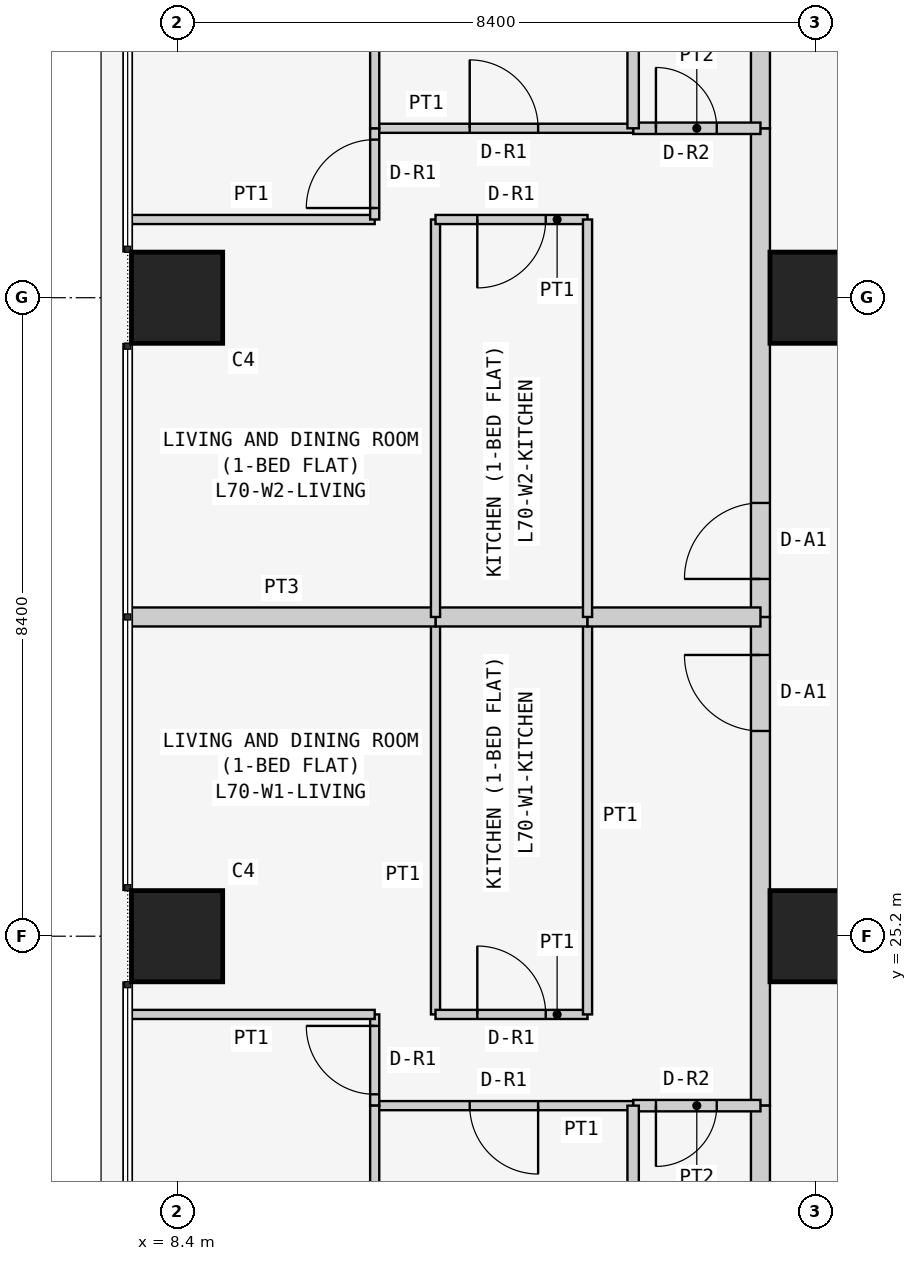
"""IFC4 building model, lengths in metres.
Left out: names, types, materials, properties, quantities, classifications, styles, units other than length and angle.
Written with IfcOpenShell. Run it as: python <this file> out.ifc"""

import sys

from ifc_helpers import new_model, si_unit, direction, frame, frame_2d, origin, origin_2d, place, context, subcontext, project, spatial, rectangle, extrude, element, fill, save


model = new_model("IFC4")
c1 = context("Model", 3, precision=1e-05, world=origin(), true_north=direction((0.0, 1.0)))
c2 = subcontext(c1, "Body", "Model", "MODEL_VIEW")
j1 = project(units=[si_unit("LENGTHUNIT", "METRE"), si_unit("PLANEANGLEUNIT", "RADIAN")], contexts=[c1])
p1 = place(None, origin())
s1 = spatial("IfcSite", under=j1, at=p1, CompositionType="ELEMENT")
p2 = place(p1, origin())
s2 = spatial("IfcBuilding", under=s1, at=p2, CompositionType="ELEMENT")
p3 = place(p2, frame((0.0, 0.0, 268.5)))
s3 = spatial("IfcBuildingStorey", under=s2, at=p3, CompositionType="ELEMENT", Elevation=268.5)
for number, where, z_axis, x_axis in (
    (1, (8.4, 25.2, 0.0), (0.0, 0.0, 1.0), (1.0, 0.0, 0.0)),
    (2, (8.4, 33.6, 0.0), (0.0, 0.0, 1.0), (1.0, 0.0, 0.0)),
    (3, (16.8, 25.2, 0.0), (0.0, 0.0, 1.0), (1.0, 0.0, 0.0)),
    (4, (16.8, 33.6, 0.0), (0.0, 0.0, 1.0), (1.0, 0.0, 0.0)),
):
    element("IfcColumn", number, at=place(p3, frame(where, z_axis=z_axis, x_axis=x_axis)), inside=s3, PredefinedType="COLUMN", context=c2, shape_type="SweptSolid", body=[
        extrude(rectangle(XDim=1.2, YDim=1.2, at=origin_2d()), origin(), (0.0, 0.0, 1.0), 3.6),
    ])
p4 = place(p3, frame((16.075, 22.971, 0.0), z_axis=(0.0, 0.0, 1.0), x_axis=(0.0, 1.0, 0.0)))
e5 = element("IfcWall", 5, at=p4, inside=s3, PredefinedType="PARTITIONING", context=c2, shape_type="SweptSolid", body=[
    extrude(rectangle(XDim=6.429, YDim=0.25, at=frame_2d((3.214, 0.0))), origin(), (0.0, 0.0, 1.0), 3.45),
])
p5 = place(p4, frame((4.929, 0.0, 0.0)))
e6 = element("IfcOpeningElement", 6, at=p5, cuts=e5, PredefinedType="OPENING", context=c2, shape_type="SweptSolid", body=[
    extrude(rectangle(XDim=1.0, YDim=2.1, at=frame_2d((0.5, 1.05))), frame((0.0, 0.135, 0.0), z_axis=(0.0, -1.0, 0.0), x_axis=(1.0, 0.0, 0.0)), (0.0, 0.0, 1.0), 0.27),
])
p6 = place(p3, frame((16.075, 16.1, 0.0), z_axis=(0.0, 0.0, 1.0), x_axis=(0.0, 1.0, 0.0)))
e7 = element("IfcWall", 7, at=p6, inside=s3, PredefinedType="PARTITIONING", context=c2, shape_type="SweptSolid", body=[
    extrude(rectangle(XDim=6.871, YDim=0.25, at=frame_2d((3.436, 0.0))), origin(), (0.0, 0.0, 1.0), 3.45),
])
p7 = place(p3, frame((16.075, 29.4, 0.0), z_axis=(0.0, 0.0, 1.0), x_axis=(0.0, 1.0, 0.0)))
e8 = element("IfcWall", 8, at=p7, inside=s3, PredefinedType="PARTITIONING", context=c2, shape_type="SweptSolid", body=[
    extrude(rectangle(XDim=6.429, YDim=0.25, at=frame_2d((3.215, 0.0))), origin(), (0.0, 0.0, 1.0), 3.45),
])
p8 = place(p7, frame((0.5, 0.0, 0.0)))
e9 = element("IfcOpeningElement", 9, at=p8, cuts=e8, PredefinedType="OPENING", context=c2, shape_type="SweptSolid", body=[
    extrude(rectangle(XDim=1.0, YDim=2.1, at=frame_2d((0.5, 1.05))), frame((0.0, 0.135, 0.0), z_axis=(0.0, -1.0, 0.0), x_axis=(1.0, 0.0, 0.0)), (0.0, 0.0, 1.0), 0.27),
])
p9 = place(p3, frame((16.075, 35.829, 0.0), z_axis=(0.0, 0.0, 1.0), x_axis=(0.0, 1.0, 0.0)))
e10 = element("IfcWall", 10, at=p9, inside=s3, PredefinedType="PARTITIONING", context=c2, shape_type="SweptSolid", body=[
    extrude(rectangle(XDim=6.871, YDim=0.25, at=frame_2d((3.436, 0.0))), origin(), (0.0, 0.0, 1.0), 3.45),
])
p10 = place(p3, frame((11.8, 29.4, 0.0), z_axis=(0.0, 0.0, 1.0), x_axis=(0.0, -1.0, 0.0)))
e11 = element("IfcWall", 11, at=p10, inside=s3, PredefinedType="PARTITIONING", context=c2, shape_type="SweptSolid", body=[
    extrude(rectangle(XDim=5.229, YDim=0.12, at=frame_2d((2.615, 0.0))), origin(), (0.0, 0.0, 1.0), 3.45),
])
p11 = place(p3, frame((11.8, 24.171, 0.0), z_axis=(0.0, 0.0, 1.0), x_axis=(1.0, 0.0, 0.0)))
e12 = element("IfcWall", 12, at=p11, inside=s3, PredefinedType="PARTITIONING", context=c2, shape_type="SweptSolid", body=[
    extrude(rectangle(XDim=2.0, YDim=0.12, at=frame_2d((1.0, 0.0))), origin(), (0.0, 0.0, 1.0), 3.45),
])
p12 = place(p11, frame((0.55, 0.0, 0.0)))
e13 = element("IfcOpeningElement", 13, at=p12, cuts=e12, PredefinedType="OPENING", context=c2, shape_type="SweptSolid", body=[
    extrude(rectangle(XDim=0.9, YDim=2.1, at=frame_2d((0.45, 1.05))), frame((0.0, 0.07, 0.0), z_axis=(0.0, -1.0, 0.0), x_axis=(1.0, 0.0, 0.0)), (0.0, 0.0, 1.0), 0.14),
])
p13 = place(p3, frame((13.8, 24.171, 0.0), z_axis=(0.0, 0.0, 1.0), x_axis=(0.0, 1.0, 0.0)))
e14 = element("IfcWall", 14, at=p13, inside=s3, PredefinedType="PARTITIONING", context=c2, shape_type="SweptSolid", body=[
    extrude(rectangle(XDim=5.229, YDim=0.12, at=frame_2d((2.615, 0.0))), origin(), (0.0, 0.0, 1.0), 3.45),
])
p14 = place(p3, frame((13.8, 29.4, 0.0), z_axis=(0.0, 0.0, 1.0), x_axis=(-1.0, 0.0, 0.0)))
e15 = element("IfcWall", 15, at=p14, inside=s3, PredefinedType="PARTITIONING", context=c2, shape_type="SweptSolid", body=[
    extrude(rectangle(XDim=2.0, YDim=0.25, at=frame_2d((1.0, 0.0))), origin(), (0.0, 0.0, 1.0), 3.45),
])
p15 = place(p3, frame((16.075, 22.971, 0.0), z_axis=(0.0, 0.0, 1.0), x_axis=(-1.0, 0.0, 0.0)))
e16 = element("IfcWall", 16, at=p15, inside=s3, PredefinedType="PARTITIONING", context=c2, shape_type="SweptSolid", body=[
    extrude(rectangle(XDim=1.675, YDim=0.15, at=frame_2d((0.837, 0.0))), origin(), (0.0, 0.0, 1.0), 3.45),
])
p16 = place(p15, frame((0.575, 0.0, 0.0)))
e17 = element("IfcOpeningElement", 17, at=p16, cuts=e16, PredefinedType="OPENING", context=c2, shape_type="SweptSolid", body=[
    extrude(rectangle(XDim=0.8, YDim=2.1, at=frame_2d((0.4, 1.05))), frame((0.0, 0.085, 0.0), z_axis=(0.0, -1.0, 0.0), x_axis=(1.0, 0.0, 0.0)), (0.0, 0.0, 1.0), 0.17),
])
p17 = place(p3, frame((14.4, 22.971, 0.0), z_axis=(0.0, 0.0, 1.0), x_axis=(-1.0, 0.0, 0.0)))
e18 = element("IfcWall", 18, at=p17, inside=s3, PredefinedType="PARTITIONING", context=c2, shape_type="SweptSolid", body=[
    extrude(rectangle(XDim=3.4, YDim=0.12, at=frame_2d((1.7, 0.0))), origin(), (0.0, 0.0, 1.0), 3.45),
])
p18 = place(p17, frame((1.25, 0.0, 0.0)))
e19 = element("IfcOpeningElement", 19, at=p18, cuts=e18, PredefinedType="OPENING", context=c2, shape_type="SweptSolid", body=[
    extrude(rectangle(XDim=0.9, YDim=2.1, at=frame_2d((0.45, 1.05))), frame((0.0, 0.07, 0.0), z_axis=(0.0, -1.0, 0.0), x_axis=(1.0, 0.0, 0.0)), (0.0, 0.0, 1.0), 0.14),
])
p19 = place(p3, frame((11.0, 22.971, 0.0), z_axis=(0.0, 0.0, 1.0), x_axis=(0.0, 1.0, 0.0)))
e20 = element("IfcWall", 20, at=p19, inside=s3, PredefinedType="PARTITIONING", context=c2, shape_type="SweptSolid", body=[
    extrude(rectangle(XDim=1.2, YDim=0.12, at=frame_2d((0.6, 0.0))), origin(), (0.0, 0.0, 1.0), 3.45),
])
p20 = place(p19, frame((0.149, 0.0, 0.0)))
e21 = element("IfcOpeningElement", 21, at=p20, cuts=e20, PredefinedType="OPENING", context=c2, shape_type="SweptSolid", body=[
    extrude(rectangle(XDim=0.9, YDim=2.1, at=frame_2d((0.45, 1.05))), frame((0.0, 0.07, 0.0), z_axis=(0.0, -1.0, 0.0), x_axis=(1.0, 0.0, 0.0)), (0.0, 0.0, 1.0), 0.14),
])
p21 = place(p3, frame((11.0, 24.171, 0.0), z_axis=(0.0, 0.0, 1.0), x_axis=(-1.0, 0.0, 0.0)))
e22 = element("IfcWall", 22, at=p21, inside=s3, PredefinedType="PARTITIONING", context=c2, shape_type="SweptSolid", body=[
    extrude(rectangle(XDim=3.25, YDim=0.12, at=frame_2d((1.625, 0.0))), origin(), (0.0, 0.0, 1.0), 3.45),
])
p22 = place(p3, frame((7.75, 29.4, 0.0), z_axis=(0.0, 0.0, 1.0), x_axis=(1.0, 0.0, 0.0)))
e23 = element("IfcWall", 23, at=p22, inside=s3, PredefinedType="PARTITIONING", context=c2, shape_type="SweptSolid", body=[
    extrude(rectangle(XDim=4.05, YDim=0.25, at=frame_2d((2.025, 0.0))), origin(), (0.0, 0.0, 1.0), 3.45),
])
p23 = place(p3, frame((13.8, 29.4, 0.0), z_axis=(0.0, 0.0, 1.0), x_axis=(1.0, 0.0, 0.0)))
e24 = element("IfcWall", 24, at=p23, inside=s3, PredefinedType="PARTITIONING", context=c2, shape_type="SweptSolid", body=[
    extrude(rectangle(XDim=2.275, YDim=0.25, at=frame_2d((1.137, 0.0))), origin(), (0.0, 0.0, 1.0), 3.45),
])
p24 = place(p3, frame((14.4, 22.971, 0.0), z_axis=(0.0, 0.0, 1.0), x_axis=(0.0, -1.0, 0.0)))
e25 = element("IfcWall", 25, at=p24, inside=s3, PredefinedType="PARTITIONING", context=c2, shape_type="SweptSolid", body=[
    extrude(rectangle(XDim=6.871, YDim=0.15, at=frame_2d((3.436, 0.0))), origin(), (0.0, 0.0, 1.0), 3.45),
])
p25 = place(p3, frame((11.0, 22.971, 0.0), z_axis=(0.0, 0.0, 1.0), x_axis=(0.0, -1.0, 0.0)))
e26 = element("IfcWall", 26, at=p25, inside=s3, PredefinedType="PARTITIONING", context=c2, shape_type="SweptSolid", body=[
    extrude(rectangle(XDim=6.871, YDim=0.12, at=frame_2d((3.436, 0.0))), origin(), (0.0, 0.0, 1.0), 3.45),
])
p26 = place(p3, frame((11.8, 29.4, 0.0), z_axis=(0.0, 0.0, 1.0), x_axis=(0.0, 1.0, 0.0)))
e27 = element("IfcWall", 27, at=p26, inside=s3, PredefinedType="PARTITIONING", context=c2, shape_type="SweptSolid", body=[
    extrude(rectangle(XDim=5.229, YDim=0.12, at=frame_2d((2.615, 0.0))), origin(), (0.0, 0.0, 1.0), 3.45),
])
p27 = place(p3, frame((11.8, 34.629, 0.0), z_axis=(0.0, 0.0, 1.0), x_axis=(1.0, 0.0, 0.0)))
e28 = element("IfcWall", 28, at=p27, inside=s3, PredefinedType="PARTITIONING", context=c2, shape_type="SweptSolid", body=[
    extrude(rectangle(XDim=2.0, YDim=0.12, at=frame_2d((1.0, 0.0))), origin(), (0.0, 0.0, 1.0), 3.45),
])
p28 = place(p27, frame((0.55, 0.0, 0.0)))
e29 = element("IfcOpeningElement", 29, at=p28, cuts=e28, PredefinedType="OPENING", context=c2, shape_type="SweptSolid", body=[
    extrude(rectangle(XDim=0.9, YDim=2.1, at=frame_2d((0.45, 1.05))), frame((0.0, 0.07, 0.0), z_axis=(0.0, -1.0, 0.0), x_axis=(1.0, 0.0, 0.0)), (0.0, 0.0, 1.0), 0.14),
])
p29 = place(p3, frame((13.8, 34.629, 0.0), z_axis=(0.0, 0.0, 1.0), x_axis=(0.0, -1.0, 0.0)))
e30 = element("IfcWall", 30, at=p29, inside=s3, PredefinedType="PARTITIONING", context=c2, shape_type="SweptSolid", body=[
    extrude(rectangle(XDim=5.229, YDim=0.12, at=frame_2d((2.615, 0.0))), origin(), (0.0, 0.0, 1.0), 3.45),
])
p30 = place(p3, frame((14.4, 35.829, 0.0), z_axis=(0.0, 0.0, 1.0), x_axis=(1.0, 0.0, 0.0)))
e31 = element("IfcWall", 31, at=p30, inside=s3, PredefinedType="PARTITIONING", context=c2, shape_type="SweptSolid", body=[
    extrude(rectangle(XDim=1.675, YDim=0.15, at=frame_2d((0.837, 0.0))), origin(), (0.0, 0.0, 1.0), 3.45),
])
p31 = place(p30, frame((0.3, 0.0, 0.0)))
e32 = element("IfcOpeningElement", 32, at=p31, cuts=e31, PredefinedType="OPENING", context=c2, shape_type="SweptSolid", body=[
    extrude(rectangle(XDim=0.8, YDim=2.1, at=frame_2d((0.4, 1.05))), frame((0.0, 0.085, 0.0), z_axis=(0.0, -1.0, 0.0), x_axis=(1.0, 0.0, 0.0)), (0.0, 0.0, 1.0), 0.17),
])
p32 = place(p3, frame((11.0, 35.829, 0.0), z_axis=(0.0, 0.0, 1.0), x_axis=(1.0, 0.0, 0.0)))
e33 = element("IfcWall", 33, at=p32, inside=s3, PredefinedType="PARTITIONING", context=c2, shape_type="SweptSolid", body=[
    extrude(rectangle(XDim=3.4, YDim=0.12, at=frame_2d((1.7, 0.0))), origin(), (0.0, 0.0, 1.0), 3.45),
])
p33 = place(p32, frame((1.25, 0.0, 0.0)))
e34 = element("IfcOpeningElement", 34, at=p33, cuts=e33, PredefinedType="OPENING", context=c2, shape_type="SweptSolid", body=[
    extrude(rectangle(XDim=0.9, YDim=2.1, at=frame_2d((0.45, 1.05))), frame((0.0, 0.07, 0.0), z_axis=(0.0, -1.0, 0.0), x_axis=(1.0, 0.0, 0.0)), (0.0, 0.0, 1.0), 0.14),
])
p34 = place(p3, frame((7.75, 34.629, 0.0), z_axis=(0.0, 0.0, 1.0), x_axis=(1.0, 0.0, 0.0)))
e35 = element("IfcWall", 35, at=p34, inside=s3, PredefinedType="PARTITIONING", context=c2, shape_type="SweptSolid", body=[
    extrude(rectangle(XDim=3.25, YDim=0.12, at=frame_2d((1.625, 0.0))), origin(), (0.0, 0.0, 1.0), 3.45),
])
p35 = place(p3, frame((11.0, 34.629, 0.0), z_axis=(0.0, 0.0, 1.0), x_axis=(0.0, 1.0, 0.0)))
e36 = element("IfcWall", 36, at=p35, inside=s3, PredefinedType="PARTITIONING", context=c2, shape_type="SweptSolid", body=[
    extrude(rectangle(XDim=1.2, YDim=0.12, at=frame_2d((0.6, 0.0))), origin(), (0.0, 0.0, 1.0), 3.45),
])
p36 = place(p35, frame((0.151, 0.0, 0.0)))
e37 = element("IfcOpeningElement", 37, at=p36, cuts=e36, PredefinedType="OPENING", context=c2, shape_type="SweptSolid", body=[
    extrude(rectangle(XDim=0.9, YDim=2.1, at=frame_2d((0.45, 1.05))), frame((0.0, 0.07, 0.0), z_axis=(0.0, -1.0, 0.0), x_axis=(1.0, 0.0, 0.0)), (0.0, 0.0, 1.0), 0.14),
])
p37 = place(p3, frame((14.4, 35.829, 0.0), z_axis=(0.0, 0.0, 1.0), x_axis=(0.0, 1.0, 0.0)))
e38 = element("IfcWall", 38, at=p37, inside=s3, PredefinedType="PARTITIONING", context=c2, shape_type="SweptSolid", body=[
    extrude(rectangle(XDim=6.871, YDim=0.15, at=frame_2d((3.436, 0.0))), origin(), (0.0, 0.0, 1.0), 3.45),
])
p38 = place(p3, frame((11.0, 35.829, 0.0), z_axis=(0.0, 0.0, 1.0), x_axis=(0.0, 1.0, 0.0)))
e39 = element("IfcWall", 39, at=p38, inside=s3, PredefinedType="PARTITIONING", context=c2, shape_type="SweptSolid", body=[
    extrude(rectangle(XDim=6.871, YDim=0.12, at=frame_2d((3.436, 0.0))), origin(), (0.0, 0.0, 1.0), 3.45),
])
p39 = place(p5, origin())
e40 = element("IfcDoor", 40, at=p39, inside=s3, OperationType="SINGLE_SWING_RIGHT", PredefinedType="DOOR", context=c2, shape_type="SweptSolid", body=[
    extrude(rectangle(XDim=1.0, YDim=2.1, at=frame_2d((0.5, 1.05))), frame((0.0, 0.025, 0.0), z_axis=(0.0, -1.0, 0.0), x_axis=(1.0, 0.0, 0.0)), (0.0, 0.0, 1.0), 0.05),
])
fill(e6, e40)
p40 = place(p12, origin())
e41 = element("IfcDoor", 41, at=p40, inside=s3, OperationType="SINGLE_SWING_LEFT", PredefinedType="DOOR", context=c2, shape_type="SweptSolid", body=[
    extrude(rectangle(XDim=0.9, YDim=2.1, at=frame_2d((0.45, 1.05))), frame((0.0, 0.025, 0.0), z_axis=(0.0, -1.0, 0.0), x_axis=(1.0, 0.0, 0.0)), (0.0, 0.0, 1.0), 0.05),
])
fill(e13, e41)
p41 = place(p16, origin())
e42 = element("IfcDoor", 42, at=p41, inside=s3, OperationType="SINGLE_SWING_RIGHT", PredefinedType="DOOR", context=c2, shape_type="SweptSolid", body=[
    extrude(rectangle(XDim=0.8, YDim=2.1, at=frame_2d((0.4, 1.05))), frame((0.0, 0.025, 0.0), z_axis=(0.0, -1.0, 0.0), x_axis=(1.0, 0.0, 0.0)), (0.0, 0.0, 1.0), 0.05),
])
fill(e17, e42)
p42 = place(p18, origin())
e43 = element("IfcDoor", 43, at=p42, inside=s3, OperationType="SINGLE_SWING_LEFT", PredefinedType="DOOR", context=c2, shape_type="SweptSolid", body=[
    extrude(rectangle(XDim=0.9, YDim=2.1, at=frame_2d((0.45, 1.05))), frame((0.0, 0.025, 0.0), z_axis=(0.0, -1.0, 0.0), x_axis=(1.0, 0.0, 0.0)), (0.0, 0.0, 1.0), 0.05),
])
fill(e19, e43)
p43 = place(p20, origin())
e44 = element("IfcDoor", 44, at=p43, inside=s3, OperationType="SINGLE_SWING_RIGHT", PredefinedType="DOOR", context=c2, shape_type="SweptSolid", body=[
    extrude(rectangle(XDim=0.9, YDim=2.1, at=frame_2d((0.45, 1.05))), frame((0.0, 0.025, 0.0), z_axis=(0.0, -1.0, 0.0), x_axis=(1.0, 0.0, 0.0)), (0.0, 0.0, 1.0), 0.05),
])
fill(e21, e44)
p44 = place(p8, origin())
e45 = element("IfcDoor", 45, at=p44, inside=s3, OperationType="SINGLE_SWING_LEFT", PredefinedType="DOOR", context=c2, shape_type="SweptSolid", body=[
    extrude(rectangle(XDim=1.0, YDim=2.1, at=frame_2d((0.5, 1.05))), frame((0.0, 0.025, 0.0), z_axis=(0.0, -1.0, 0.0), x_axis=(1.0, 0.0, 0.0)), (0.0, 0.0, 1.0), 0.05),
])
fill(e9, e45)
p45 = place(p28, frame((0.9, 0.0, 0.0), z_axis=(0.0, 0.0, 1.0), x_axis=(-1.0, 0.0, 0.0)))
e46 = element("IfcDoor", 46, at=p45, inside=s3, OperationType="SINGLE_SWING_RIGHT", PredefinedType="DOOR", context=c2, shape_type="SweptSolid", body=[
    extrude(rectangle(XDim=0.9, YDim=2.1, at=frame_2d((0.45, 1.05))), frame((0.0, 0.025, 0.0), z_axis=(0.0, -1.0, 0.0), x_axis=(1.0, 0.0, 0.0)), (0.0, 0.0, 1.0), 0.05),
])
fill(e29, e46)
p46 = place(p31, origin())
e47 = element("IfcDoor", 47, at=p46, inside=s3, OperationType="SINGLE_SWING_LEFT", PredefinedType="DOOR", context=c2, shape_type="SweptSolid", body=[
    extrude(rectangle(XDim=0.8, YDim=2.1, at=frame_2d((0.4, 1.05))), frame((0.0, 0.025, 0.0), z_axis=(0.0, -1.0, 0.0), x_axis=(1.0, 0.0, 0.0)), (0.0, 0.0, 1.0), 0.05),
])
fill(e32, e47)
p47 = place(p33, origin())
e48 = element("IfcDoor", 48, at=p47, inside=s3, OperationType="SINGLE_SWING_LEFT", PredefinedType="DOOR", context=c2, shape_type="SweptSolid", body=[
    extrude(rectangle(XDim=0.9, YDim=2.1, at=frame_2d((0.45, 1.05))), frame((0.0, 0.025, 0.0), z_axis=(0.0, -1.0, 0.0), x_axis=(1.0, 0.0, 0.0)), (0.0, 0.0, 1.0), 0.05),
])
fill(e34, e48)
p48 = place(p36, origin())
e49 = element("IfcDoor", 49, at=p48, inside=s3, OperationType="SINGLE_SWING_LEFT", PredefinedType="DOOR", context=c2, shape_type="SweptSolid", body=[
    extrude(rectangle(XDim=0.9, YDim=2.1, at=frame_2d((0.45, 1.05))), frame((0.0, 0.025, 0.0), z_axis=(0.0, -1.0, 0.0), x_axis=(1.0, 0.0, 0.0)), (0.0, 0.0, 1.0), 0.05),
])
fill(e37, e49)
save(model, sys.argv[1])
